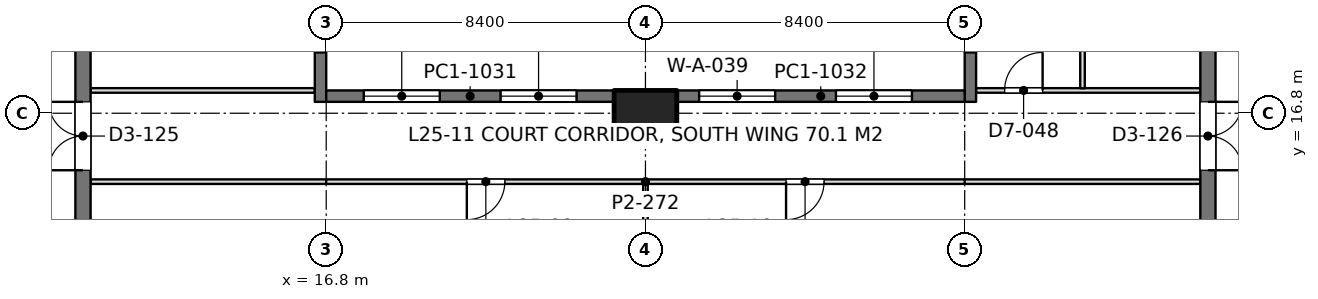
"""IFC4 building model, lengths in metres.
Left out: names, types, materials, properties, quantities, classifications, styles, units other than length and angle.
Written with IfcOpenShell. Run it as: python <this file> out.ifc"""

import sys

from ifc_helpers import new_model, si_unit, direction, frame, frame_2d, origin, origin_2d, place, context, subcontext, project, spatial, rectangle, extrude, element, fill, save


model = new_model("IFC4")
c1 = context("Model", 3, precision=1e-05, world=origin(), true_north=direction((0.0, 1.0)))
c2 = subcontext(c1, "Body", "Model", "MODEL_VIEW")
j1 = project(units=[si_unit("LENGTHUNIT", "METRE"), si_unit("PLANEANGLEUNIT", "RADIAN")], contexts=[c1])
p1 = place(None, origin())
s1 = spatial("IfcSite", under=j1, at=p1, CompositionType="ELEMENT")
p2 = place(p1, origin())
s2 = spatial("IfcBuilding", under=s1, at=p2, CompositionType="ELEMENT")
p3 = place(p2, frame((0.0, 0.0, 113.4)))
s3 = spatial("IfcBuildingStorey", under=s2, at=p3, CompositionType="ELEMENT", Elevation=113.4)
p4 = place(p3, frame((25.2, 16.8, 0.0), z_axis=(0.0, 0.0, 1.0), x_axis=(1.0, 0.0, 0.0)))
e1 = element("IfcColumn", 1, at=p4, inside=s3, PredefinedType="COLUMN", context=c2, shape_type="SweptSolid", body=[
    extrude(rectangle(XDim=1.65, YDim=1.2, at=origin_2d()), origin(), (0.0, 0.0, 1.0), 4.2),
])
p5 = place(p3, frame((10.4, 13.05, 0.0), z_axis=(0.0, 0.0, 1.0), x_axis=(0.0, 1.0, 0.0)))
e2 = element("IfcWall", 2, at=p5, inside=s3, PredefinedType="SHEAR", context=c2, shape_type="SweptSolid", body=[
    extrude(rectangle(XDim=24.3, YDim=0.4, at=frame_2d((12.15, 0.0))), origin(), (0.0, 0.0, 1.0), 4.2),
])
p6 = place(p5, frame((10.05, 0.0, 0.0)))
e3 = element("IfcOpeningElement", 3, at=p6, cuts=e2, PredefinedType="OPENING", context=c2, shape_type="SweptSolid", body=[
    extrude(rectangle(XDim=1.1, YDim=2.2, at=frame_2d((0.55, 1.1))), frame((0.0, 0.21, 0.0), z_axis=(0.0, -1.0, 0.0), x_axis=(1.0, 0.0, 0.0)), (0.0, 0.0, 1.0), 0.42),
])
p7 = place(p5, frame((12.9, 0.0, 0.0)))
e4 = element("IfcOpeningElement", 4, at=p7, cuts=e2, PredefinedType="OPENING", context=c2, shape_type="SweptSolid", body=[
    extrude(rectangle(XDim=1.1, YDim=2.2, at=frame_2d((0.55, 1.1))), frame((0.0, 0.21, 0.0), z_axis=(0.0, -1.0, 0.0), x_axis=(1.0, 0.0, 0.0)), (0.0, 0.0, 1.0), 0.42),
])
p8 = place(p5, frame((21.45, 0.0, 0.0)))
e5 = element("IfcOpeningElement", 5, at=p8, cuts=e2, PredefinedType="OPENING", context=c2, shape_type="SweptSolid", body=[
    extrude(rectangle(XDim=1.1, YDim=2.2, at=frame_2d((0.55, 1.1))), frame((0.0, 0.21, 0.0), z_axis=(0.0, -1.0, 0.0), x_axis=(1.0, 0.0, 0.0)), (0.0, 0.0, 1.0), 0.42),
])
p9 = place(p5, frame((2.25, 0.0, 0.0)))
e6 = element("IfcOpeningElement", 6, at=p9, cuts=e2, PredefinedType="OPENING", context=c2, shape_type="SweptSolid", body=[
    extrude(rectangle(XDim=1.8, YDim=2.4, at=frame_2d((0.9, 1.2))), frame((0.0, 0.21, 0.0), z_axis=(0.0, -1.0, 0.0), x_axis=(1.0, 0.0, 0.0)), (0.0, 0.0, 1.0), 0.42),
])
p10 = place(p5, frame((5.8, 0.0, 0.0)))
e7 = element("IfcOpeningElement", 7, at=p10, cuts=e2, PredefinedType="OPENING", context=c2, shape_type="SweptSolid", body=[
    extrude(rectangle(XDim=1.8, YDim=2.4, at=frame_2d((0.9, 1.2))), frame((0.0, 0.21, 0.0), z_axis=(0.0, -1.0, 0.0), x_axis=(1.0, 0.0, 0.0)), (0.0, 0.0, 1.0), 0.42),
])
p11 = place(p3, frame((40.0, 13.05, 0.0), z_axis=(0.0, 0.0, 1.0), x_axis=(0.0, 1.0, 0.0)))
e8 = element("IfcWall", 8, at=p11, inside=s3, PredefinedType="SHEAR", context=c2, shape_type="SweptSolid", body=[
    extrude(rectangle(XDim=24.3, YDim=0.4, at=frame_2d((12.15, 0.0))), origin(), (0.0, 0.0, 1.0), 4.2),
])
p12 = place(p11, frame((10.05, 0.0, 0.0)))
e9 = element("IfcOpeningElement", 9, at=p12, cuts=e8, PredefinedType="OPENING", context=c2, shape_type="SweptSolid", body=[
    extrude(rectangle(XDim=1.1, YDim=2.2, at=frame_2d((0.55, 1.1))), frame((0.0, 0.21, 0.0), z_axis=(0.0, -1.0, 0.0), x_axis=(1.0, 0.0, 0.0)), (0.0, 0.0, 1.0), 0.42),
])
p13 = place(p11, frame((12.9, 0.0, 0.0)))
e10 = element("IfcOpeningElement", 10, at=p13, cuts=e8, PredefinedType="OPENING", context=c2, shape_type="SweptSolid", body=[
    extrude(rectangle(XDim=1.1, YDim=2.2, at=frame_2d((0.55, 1.1))), frame((0.0, 0.21, 0.0), z_axis=(0.0, -1.0, 0.0), x_axis=(1.0, 0.0, 0.0)), (0.0, 0.0, 1.0), 0.42),
])
p14 = place(p11, frame((21.45, 0.0, 0.0)))
e11 = element("IfcOpeningElement", 11, at=p14, cuts=e8, PredefinedType="OPENING", context=c2, shape_type="SweptSolid", body=[
    extrude(rectangle(XDim=1.1, YDim=2.2, at=frame_2d((0.55, 1.1))), frame((0.0, 0.21, 0.0), z_axis=(0.0, -1.0, 0.0), x_axis=(1.0, 0.0, 0.0)), (0.0, 0.0, 1.0), 0.42),
])
p15 = place(p11, frame((2.25, 0.0, 0.0)))
e12 = element("IfcOpeningElement", 12, at=p15, cuts=e8, PredefinedType="OPENING", context=c2, shape_type="SweptSolid", body=[
    extrude(rectangle(XDim=1.8, YDim=2.4, at=frame_2d((0.9, 1.2))), frame((0.0, 0.21, 0.0), z_axis=(0.0, -1.0, 0.0), x_axis=(1.0, 0.0, 0.0)), (0.0, 0.0, 1.0), 0.42),
])
p16 = place(p11, frame((5.8, 0.0, 0.0)))
e13 = element("IfcOpeningElement", 13, at=p16, cuts=e8, PredefinedType="OPENING", context=c2, shape_type="SweptSolid", body=[
    extrude(rectangle(XDim=1.8, YDim=2.4, at=frame_2d((0.9, 1.2))), frame((0.0, 0.21, 0.0), z_axis=(0.0, -1.0, 0.0), x_axis=(1.0, 0.0, 0.0)), (0.0, 0.0, 1.0), 0.42),
])
p17 = place(p3, frame((16.65, 17.1, 0.0), z_axis=(0.0, 0.0, 1.0), x_axis=(0.0, 1.0, 0.0)))
e14 = element("IfcWall", 14, at=p17, inside=s3, PredefinedType="SOLIDWALL", context=c2, shape_type="SweptSolid", body=[
    extrude(rectangle(XDim=5.0, YDim=0.3, at=frame_2d((2.5, 0.0))), origin(), (0.0, 0.0, 1.0), 4.05),
])
p18 = place(p17, frame((1.3, 0.0, 0.1)))
e15 = element("IfcOpeningElement", 15, at=p18, cuts=e14, PredefinedType="OPENING", context=c2, shape_type="SweptSolid", body=[
    extrude(rectangle(XDim=2.0, YDim=3.0, at=frame_2d((1.0, 1.5))), frame((0.0, 0.16, 0.0), z_axis=(0.0, -1.0, 0.0), x_axis=(1.0, 0.0, 0.0)), (0.0, 0.0, 1.0), 0.32),
])
p19 = place(p3, frame((33.75, 17.1, 0.0), z_axis=(0.0, 0.0, 1.0), x_axis=(0.0, 1.0, 0.0)))
e16 = element("IfcWall", 16, at=p19, inside=s3, PredefinedType="SOLIDWALL", context=c2, shape_type="SweptSolid", body=[
    extrude(rectangle(XDim=5.0, YDim=0.3, at=frame_2d((2.5, 0.0))), origin(), (0.0, 0.0, 1.0), 4.05),
])
p20 = place(p19, frame((1.3, 0.0, 0.1)))
e17 = element("IfcOpeningElement", 17, at=p20, cuts=e16, PredefinedType="OPENING", context=c2, shape_type="SweptSolid", body=[
    extrude(rectangle(XDim=2.0, YDim=3.0, at=frame_2d((1.0, 1.5))), frame((0.0, 0.16, 0.0), z_axis=(0.0, -1.0, 0.0), x_axis=(1.0, 0.0, 0.0)), (0.0, 0.0, 1.0), 0.32),
])
p21 = place(p3, frame((16.8, 17.25, 0.0), z_axis=(0.0, 0.0, 1.0), x_axis=(1.0, 0.0, 0.0)))
e18 = element("IfcWall", 18, at=p21, inside=s3, PredefinedType="SOLIDWALL", context=c2, shape_type="SweptSolid", body=[
    extrude(rectangle(XDim=7.575, YDim=0.3, at=frame_2d((3.788, 0.0))), origin(), (0.0, 0.0, 1.0), 4.05),
])
p22 = place(p21, frame((0.988, 0.0, 0.1)))
e19 = element("IfcOpeningElement", 19, at=p22, cuts=e18, PredefinedType="OPENING", context=c2, shape_type="SweptSolid", body=[
    extrude(rectangle(XDim=2.0, YDim=3.0, at=frame_2d((1.0, 1.5))), frame((0.0, 0.16, 0.0), z_axis=(0.0, -1.0, 0.0), x_axis=(1.0, 0.0, 0.0)), (0.0, 0.0, 1.0), 0.32),
])
p23 = place(p21, frame((4.587, 0.0, 0.1)))
e20 = element("IfcOpeningElement", 20, at=p23, cuts=e18, PredefinedType="OPENING", context=c2, shape_type="SweptSolid", body=[
    extrude(rectangle(XDim=2.0, YDim=3.0, at=frame_2d((1.0, 1.5))), frame((0.0, 0.16, 0.0), z_axis=(0.0, -1.0, 0.0), x_axis=(1.0, 0.0, 0.0)), (0.0, 0.0, 1.0), 0.32),
])
p24 = place(p3, frame((26.025, 17.25, 0.0), z_axis=(0.0, 0.0, 1.0), x_axis=(1.0, 0.0, 0.0)))
e21 = element("IfcWall", 21, at=p24, inside=s3, PredefinedType="SOLIDWALL", context=c2, shape_type="SweptSolid", body=[
    extrude(rectangle(XDim=7.575, YDim=0.3, at=frame_2d((3.788, 0.0))), origin(), (0.0, 0.0, 1.0), 4.05),
])
p25 = place(p24, frame((0.587, 0.0, 0.1)))
e22 = element("IfcOpeningElement", 22, at=p25, cuts=e21, PredefinedType="OPENING", context=c2, shape_type="SweptSolid", body=[
    extrude(rectangle(XDim=2.0, YDim=3.0, at=frame_2d((1.0, 1.5))), frame((0.0, 0.16, 0.0), z_axis=(0.0, -1.0, 0.0), x_axis=(1.0, 0.0, 0.0)), (0.0, 0.0, 1.0), 0.32),
])
p26 = place(p24, frame((4.188, 0.0, 0.1)))
e23 = element("IfcOpeningElement", 23, at=p26, cuts=e21, PredefinedType="OPENING", context=c2, shape_type="SweptSolid", body=[
    extrude(rectangle(XDim=2.0, YDim=3.0, at=frame_2d((1.0, 1.5))), frame((0.0, 0.16, 0.0), z_axis=(0.0, -1.0, 0.0), x_axis=(1.0, 0.0, 0.0)), (0.0, 0.0, 1.0), 0.32),
])
p27 = place(p3, frame((10.598, 17.4, 0.0), z_axis=(0.0, 0.0, 1.0), x_axis=(1.0, 0.0, 0.0)))
e24 = element("IfcWall", 24, at=p27, inside=s3, PredefinedType="PARTITIONING", context=c2, shape_type="SweptSolid", body=[
    extrude(rectangle(XDim=5.904, YDim=0.12, at=frame_2d((2.952, 0.0))), origin(), (0.0, 0.0, 1.0), 3.55),
])
p28 = place(p3, frame((33.898, 17.4, 0.0), z_axis=(0.0, 0.0, 1.0), x_axis=(1.0, 0.0, 0.0)))
e25 = element("IfcWall", 25, at=p28, inside=s3, PredefinedType="PARTITIONING", context=c2, shape_type="SweptSolid", body=[
    extrude(rectangle(XDim=5.904, YDim=0.12, at=frame_2d((2.952, 0.0))), origin(), (0.0, 0.0, 1.0), 3.55),
])
p29 = place(p28, frame((0.752, 0.0, 0.0)))
e26 = element("IfcOpeningElement", 26, at=p29, cuts=e25, PredefinedType="OPENING", context=c2, shape_type="SweptSolid", body=[
    extrude(rectangle(XDim=1.0, YDim=2.4, at=frame_2d((0.5, 1.2))), frame((0.0, 0.07, 0.0), z_axis=(0.0, -1.0, 0.0), x_axis=(1.0, 0.0, 0.0)), (0.0, 0.0, 1.0), 0.14),
])
p30 = place(p3, frame((36.7, 17.458, 0.0), z_axis=(0.0, 0.0, 1.0), x_axis=(0.0, 1.0, 0.0)))
e27 = element("IfcWall", 27, at=p30, inside=s3, PredefinedType="PARTITIONING", context=c2, shape_type="SweptSolid", body=[
    extrude(rectangle(XDim=4.644, YDim=0.12, at=frame_2d((2.322, 0.0))), origin(), (0.0, 0.0, 1.0), 3.6),
])
for number, where, z_axis, x_axis in (
    (28, (10.598, 15.0, 0.0), (0.0, 0.0, 1.0), (1.0, 0.0, 0.0)),
    (29, (33.598, 15.0, 0.0), (0.0, 0.0, 1.0), (1.0, 0.0, 0.0)),
):
    element("IfcWall", number, at=place(p3, frame(where, z_axis=z_axis, x_axis=x_axis)), inside=s3, PredefinedType="PARTITIONING", context=c2, shape_type="SweptSolid", body=[
        extrude(rectangle(XDim=6.204, YDim=0.12, at=frame_2d((3.102, 0.0))), origin(), (0.0, 0.0, 1.0), 3.55),
    ])
p31 = place(p3, frame((25.2, 12.658, 0.0), z_axis=(0.0, 0.0, 1.0), x_axis=(0.0, 1.0, 0.0)))
e30 = element("IfcWall", 30, at=p31, inside=s3, PredefinedType="PARTITIONING", context=c2, shape_type="SweptSolid", body=[
    extrude(rectangle(XDim=2.284, YDim=0.12, at=frame_2d((1.142, 0.0))), origin(), (0.0, 0.0, 1.0), 3.55),
])
p32 = place(p3, frame((16.798, 15.0, 0.0), z_axis=(0.0, 0.0, 1.0), x_axis=(1.0, 0.0, 0.0)))
e31 = element("IfcWall", 31, at=p32, inside=s3, PredefinedType="PARTITIONING", context=c2, shape_type="SweptSolid", body=[
    extrude(rectangle(XDim=16.804, YDim=0.12, at=frame_2d((8.402, 0.0))), origin(), (0.0, 0.0, 1.0), 3.55),
])
p33 = place(p32, frame((3.702, 0.0, 0.0)))
e32 = element("IfcOpeningElement", 32, at=p33, cuts=e31, PredefinedType="OPENING", context=c2, shape_type="SweptSolid", body=[
    extrude(rectangle(XDim=1.0, YDim=2.4, at=frame_2d((0.5, 1.2))), frame((0.0, 0.07, 0.0), z_axis=(0.0, -1.0, 0.0), x_axis=(1.0, 0.0, 0.0)), (0.0, 0.0, 1.0), 0.14),
])
p34 = place(p32, frame((12.102, 0.0, 0.0)))
e33 = element("IfcOpeningElement", 33, at=p34, cuts=e31, PredefinedType="OPENING", context=c2, shape_type="SweptSolid", body=[
    extrude(rectangle(XDim=1.0, YDim=2.4, at=frame_2d((0.5, 1.2))), frame((0.0, 0.07, 0.0), z_axis=(0.0, -1.0, 0.0), x_axis=(1.0, 0.0, 0.0)), (0.0, 0.0, 1.0), 0.14),
])
p35 = place(p22, origin())
e34 = element("IfcWindow", 34, at=p35, inside=s3, PartitioningType="SINGLE_PANEL", PredefinedType="WINDOW", context=c2, shape_type="SweptSolid", body=[
    extrude(rectangle(XDim=2.0, YDim=3.0, at=frame_2d((1.0, 1.5))), frame((0.0, 0.03, 0.0), z_axis=(0.0, -1.0, 0.0), x_axis=(1.0, 0.0, 0.0)), (0.0, 0.0, 1.0), 0.06),
])
fill(e19, e34)
p36 = place(p23, origin())
e35 = element("IfcWindow", 35, at=p36, inside=s3, PartitioningType="SINGLE_PANEL", PredefinedType="WINDOW", context=c2, shape_type="SweptSolid", body=[
    extrude(rectangle(XDim=2.0, YDim=3.0, at=frame_2d((1.0, 1.5))), frame((0.0, 0.03, 0.0), z_axis=(0.0, -1.0, 0.0), x_axis=(1.0, 0.0, 0.0)), (0.0, 0.0, 1.0), 0.06),
])
fill(e20, e35)
p37 = place(p25, origin())
e36 = element("IfcWindow", 36, at=p37, inside=s3, PartitioningType="SINGLE_PANEL", PredefinedType="WINDOW", context=c2, shape_type="SweptSolid", body=[
    extrude(rectangle(XDim=2.0, YDim=3.0, at=frame_2d((1.0, 1.5))), frame((0.0, 0.03, 0.0), z_axis=(0.0, -1.0, 0.0), x_axis=(1.0, 0.0, 0.0)), (0.0, 0.0, 1.0), 0.06),
])
fill(e22, e36)
p38 = place(p26, origin())
e37 = element("IfcWindow", 37, at=p38, inside=s3, PartitioningType="SINGLE_PANEL", PredefinedType="WINDOW", context=c2, shape_type="SweptSolid", body=[
    extrude(rectangle(XDim=2.0, YDim=3.0, at=frame_2d((1.0, 1.5))), frame((0.0, 0.03, 0.0), z_axis=(0.0, -1.0, 0.0), x_axis=(1.0, 0.0, 0.0)), (0.0, 0.0, 1.0), 0.06),
])
fill(e23, e37)
p39 = place(p9, origin())
e38 = element("IfcDoor", 38, at=p39, inside=s3, OperationType="DOUBLE_DOOR_SINGLE_SWING", PredefinedType="DOOR", context=c2, shape_type="SweptSolid", body=[
    extrude(rectangle(XDim=1.8, YDim=2.4, at=frame_2d((0.9, 1.2))), frame((0.0, 0.025, 0.0), z_axis=(0.0, -1.0, 0.0), x_axis=(1.0, 0.0, 0.0)), (0.0, 0.0, 1.0), 0.05),
])
fill(e6, e38)
p40 = place(p15, frame((1.8, 0.0, 0.0), z_axis=(0.0, 0.0, 1.0), x_axis=(-1.0, 0.0, 0.0)))
e39 = element("IfcDoor", 39, at=p40, inside=s3, OperationType="DOUBLE_DOOR_SINGLE_SWING", PredefinedType="DOOR", context=c2, shape_type="SweptSolid", body=[
    extrude(rectangle(XDim=1.8, YDim=2.4, at=frame_2d((0.9, 1.2))), frame((0.0, 0.025, 0.0), z_axis=(0.0, -1.0, 0.0), x_axis=(1.0, 0.0, 0.0)), (0.0, 0.0, 1.0), 0.05),
])
fill(e12, e39)
p41 = place(p29, origin())
e40 = element("IfcDoor", 40, at=p41, inside=s3, OperationType="SINGLE_SWING_RIGHT", PredefinedType="DOOR", context=c2, shape_type="SweptSolid", body=[
    extrude(rectangle(XDim=1.0, YDim=2.4, at=frame_2d((0.5, 1.2))), frame((0.0, 0.025, 0.0), z_axis=(0.0, -1.0, 0.0), x_axis=(1.0, 0.0, 0.0)), (0.0, 0.0, 1.0), 0.05),
])
fill(e26, e40)
p42 = place(p33, frame((1.0, 0.0, 0.0), z_axis=(0.0, 0.0, 1.0), x_axis=(-1.0, 0.0, 0.0)))
e41 = element("IfcDoor", 41, at=p42, inside=s3, OperationType="SINGLE_SWING_RIGHT", PredefinedType="DOOR", context=c2, shape_type="SweptSolid", body=[
    extrude(rectangle(XDim=1.0, YDim=2.4, at=frame_2d((0.5, 1.2))), frame((0.0, 0.025, 0.0), z_axis=(0.0, -1.0, 0.0), x_axis=(1.0, 0.0, 0.0)), (0.0, 0.0, 1.0), 0.05),
])
fill(e32, e41)
p43 = place(p34, frame((1.0, 0.0, 0.0), z_axis=(0.0, 0.0, 1.0), x_axis=(-1.0, 0.0, 0.0)))
e42 = element("IfcDoor", 42, at=p43, inside=s3, OperationType="SINGLE_SWING_RIGHT", PredefinedType="DOOR", context=c2, shape_type="SweptSolid", body=[
    extrude(rectangle(XDim=1.0, YDim=2.4, at=frame_2d((0.5, 1.2))), frame((0.0, 0.025, 0.0), z_axis=(0.0, -1.0, 0.0), x_axis=(1.0, 0.0, 0.0)), (0.0, 0.0, 1.0), 0.05),
])
fill(e33, e42)
save(model, sys.argv[1])
